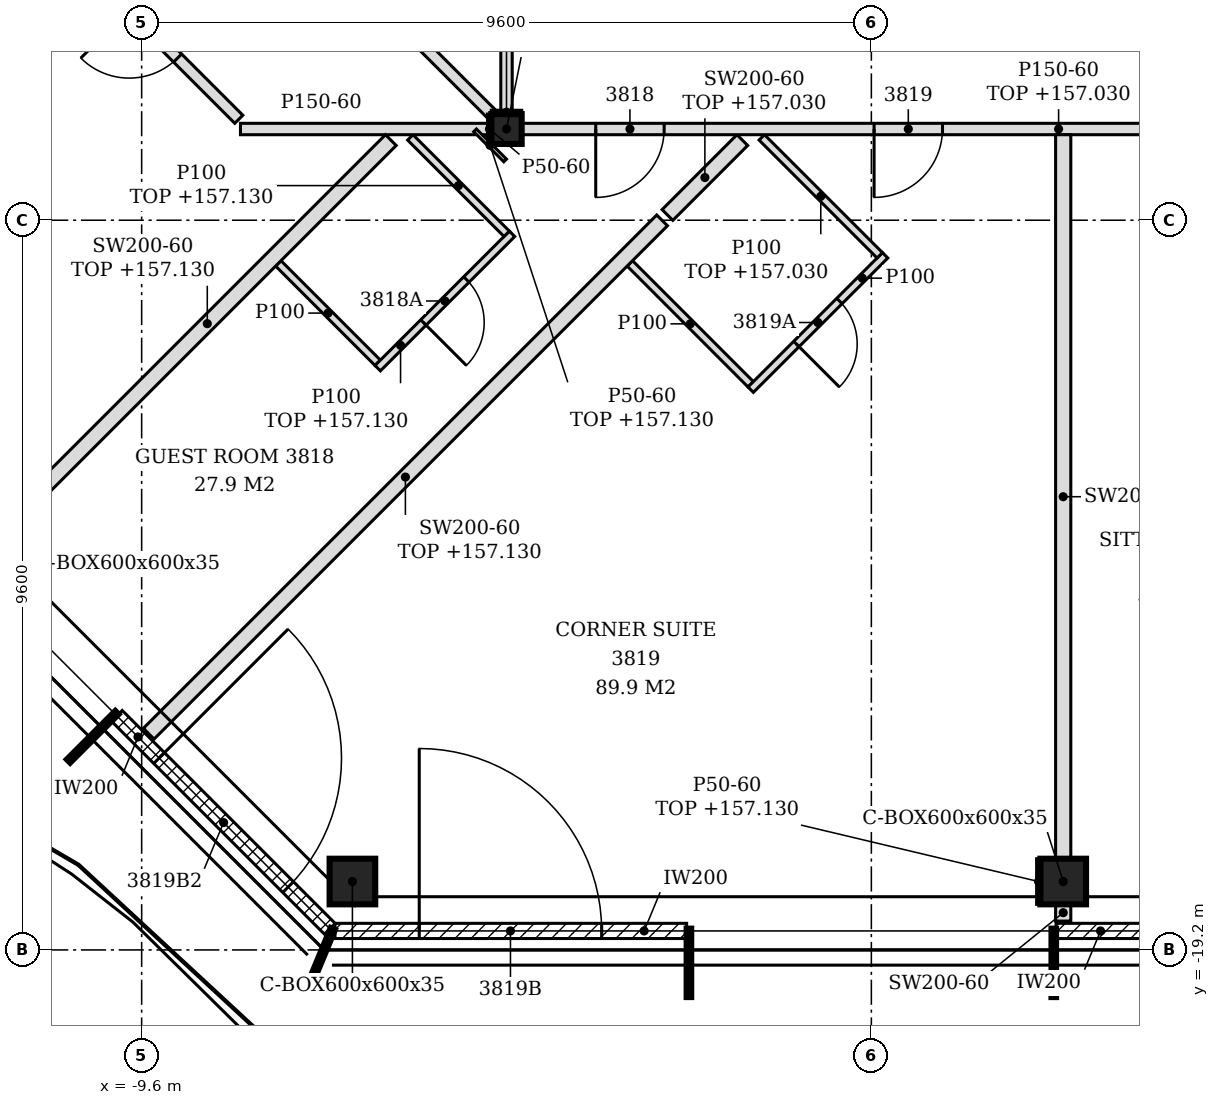
"""IFC4 building model, lengths in metres.
Left out: names, types, materials, properties, quantities, classifications, styles, units other than length and angle.
Written with IfcOpenShell. Run it as: python <this file> out.ifc"""

import sys

from ifc_helpers import new_model, si_unit, direction, frame, frame_2d, origin, origin_2d, place, context, subcontext, project, spatial, polyline, rectangle, hollow_rectangle, i_section, outline, extrude, element, fill, save


model = new_model("IFC4")
c1 = context("Model", 3, precision=1e-05, world=origin(), true_north=direction((0.0, 1.0)))
c2 = subcontext(c1, "Body", "Model", "MODEL_VIEW")
j1 = project(units=[si_unit("LENGTHUNIT", "METRE"), si_unit("PLANEANGLEUNIT", "RADIAN")], contexts=[c1])
p1 = place(None, origin())
s1 = spatial("IfcSite", under=j1, at=p1, CompositionType="ELEMENT")
p2 = place(p1, origin())
s2 = spatial("IfcBuilding", under=s1, at=p2, CompositionType="ELEMENT")
p3 = place(p2, frame((0.0, 0.0, 154.2)))
s3 = spatial("IfcBuildingStorey", under=s2, at=p3, CompositionType="ELEMENT", Elevation=154.2)
for number, where, z_axis, x_axis in (
    (1, (-6.827, -18.3, -0.15), (0.0, 0.0, 1.0), (1.0, 0.0, 0.0)),
    (2, (2.524, -18.3, -0.15), (0.0, 0.0, 1.0), (1.0, 0.0, 0.0)),
):
    element("IfcColumn", number, at=place(p3, frame(where, z_axis=z_axis, x_axis=x_axis)), inside=s3, PredefinedType="COLUMN", context=c2, shape_type="SweptSolid", body=[
        extrude(hollow_rectangle(XDim=0.6, YDim=0.6, WallThickness=0.035, at=origin_2d()), origin(), (0.0, 0.0, 1.0), 3.6),
    ])
p4 = place(p3, frame((-4.8, -8.4, -0.15), z_axis=(0.0, 0.0, 1.0), x_axis=(1.0, 0.0, 0.0)))
e3 = element("IfcColumn", 3, at=p4, inside=s3, PredefinedType="COLUMN", context=c2, shape_type="SweptSolid", body=[
    extrude(i_section(OverallWidth=0.399, OverallDepth=0.393, WebThickness=0.023, FlangeThickness=0.037, FilletRadius=0.015, at=origin_2d()), origin(), (0.0, 0.0, 1.0), 3.6),
])
p5 = place(p3, frame((-7.056, -18.95, 0.0), z_axis=(0.0, 0.0, 1.0), x_axis=(1.0, 0.0, 0.0)))
e4 = element("IfcWall", 4, at=p5, inside=s3, PredefinedType="NOTDEFINED", context=c2, shape_type="SweptSolid", body=[
    extrude(rectangle(XDim=4.626, YDim=0.2, at=frame_2d((2.313, 0.0))), origin(), (0.0, 0.0, 1.0), 3.45),
])
p6 = place(p5, frame((1.108, 0.0, 0.0)))
e5 = element("IfcOpeningElement", 5, at=p6, cuts=e4, PredefinedType="OPENING", context=c2, shape_type="SweptSolid", body=[
    extrude(rectangle(XDim=2.4, YDim=2.4, at=frame_2d((1.2, 1.2))), frame((0.0, 0.11, 0.0), z_axis=(0.0, -1.0, 0.0), x_axis=(1.0, 0.0, 0.0)), (0.0, 0.0, 1.0), 0.22),
])
p7 = place(p3, frame((2.43, -18.95, 0.0), z_axis=(0.0, 0.0, 1.0), x_axis=(1.0, 0.0, 0.0)))
e6 = element("IfcWall", 6, at=p7, inside=s3, PredefinedType="NOTDEFINED", context=c2, shape_type="SweptSolid", body=[
    extrude(rectangle(XDim=4.74, YDim=0.2, at=frame_2d((2.37, 0.0))), origin(), (0.0, 0.0, 1.0), 3.45),
])
p8 = place(p7, frame((1.17, 0.0, 0.0)))
e7 = element("IfcOpeningElement", 7, at=p8, cuts=e6, PredefinedType="OPENING", context=c2, shape_type="SweptSolid", body=[
    extrude(rectangle(XDim=2.4, YDim=2.4, at=frame_2d((1.2, 1.2))), frame((0.0, 0.11, 0.0), z_axis=(0.0, -1.0, 0.0), x_axis=(1.0, 0.0, 0.0)), (0.0, 0.0, 1.0), 0.22),
])
p9 = place(p3, frame((-9.926, -16.121, 0.0), z_axis=(0.0, 0.0, 1.0), x_axis=(0.707137595296, -0.707075965734, 0.0)))
e8 = element("IfcWall", 8, at=p9, inside=s3, PredefinedType="NOTDEFINED", context=c2, shape_type="SweptSolid", body=[
    extrude(rectangle(XDim=3.961, YDim=0.2, at=frame_2d((1.981, 0.0))), origin(), (0.0, 0.0, 1.0), 3.45),
])
p10 = place(p9, frame((0.785, 0.0, 0.0)))
e9 = element("IfcOpeningElement", 9, at=p10, cuts=e8, PredefinedType="OPENING", context=c2, shape_type="SweptSolid", body=[
    extrude(rectangle(XDim=2.4, YDim=2.4, at=frame_2d((1.2, 1.2))), frame((0.0, 0.11, 0.0), z_axis=(0.0, -1.0, 0.0), x_axis=(1.0, 0.0, 0.0)), (0.0, 0.0, 1.0), 0.22),
])
p11 = place(p3, frame((2.524, -18.82, 0.0), z_axis=(0.0, 0.0, 1.0), x_axis=(0.0, 1.0, 0.0)))
e10 = element("IfcWall", 10, at=p11, inside=s3, PredefinedType="PARTITIONING", context=c2, shape_type="SweptSolid", body=[
    extrude(rectangle(XDim=0.22, YDim=0.2, at=frame_2d((0.11, 0.0))), origin(), (0.0, 0.0, 1.0), 3.45),
])
p12 = place(p3, frame((2.524, -18.0, 0.0), z_axis=(0.0, 0.0, 1.0), x_axis=(0.0, 1.0, 0.0)))
e11 = element("IfcWall", 11, at=p12, inside=s3, PredefinedType="PARTITIONING", context=c2, shape_type="SweptSolid", body=[
    extrude(outline(polyline([(0.0, 0.0), (9.525, 0.0), (9.525, 2.83), (9.45, 2.83), (9.448, 3.45), (3.705, 3.45), (3.703, 2.88), (3.495, 2.88), (3.493, 3.45), (0.0, 3.45), (0.0, 0.0)])), frame((0.0, 0.1, 0.0), z_axis=(0.0, -1.0, 0.0), x_axis=(1.0, 0.0, 0.0)), (0.0, 0.0, 1.0), 0.2),
])
p13 = place(p3, frame((-9.507, -16.355, 0.0), z_axis=(0.0, 0.0, 1.0), x_axis=(0.707170680804, 0.707042875794, 0.0)))
e12 = element("IfcWall", 12, at=p13, inside=s3, PredefinedType="PARTITIONING", context=c2, shape_type="SweptSolid", body=[
    extrude(rectangle(XDim=9.551, YDim=0.2, at=frame_2d((4.776, 0.0))), origin(), (0.0, 0.0, 1.0), 2.93),
])
p14 = place(p3, frame((-11.152, -13.375, 0.0), z_axis=(0.0, 0.0, 1.0), x_axis=(0.707106781187, 0.707106781187, 0.0)))
e13 = element("IfcWall", 13, at=p14, inside=s3, PredefinedType="PARTITIONING", context=c2, shape_type="SweptSolid", body=[
    extrude(rectangle(XDim=6.83, YDim=0.2, at=frame_2d((3.415, 0.0))), origin(), (0.0, 0.0, 1.0), 2.93),
])
p15 = place(p3, frame((-1.587, -11.759, 0.0), z_axis=(0.0, 0.0, 1.0), x_axis=(-0.706889644159, 0.707323851557, 0.0)))
e14 = element("IfcWall", 14, at=p15, inside=s3, PredefinedType="PARTITIONING", context=c2, shape_type="SweptSolid", body=[
    extrude(rectangle(XDim=2.249, YDim=0.1, at=frame_2d((1.125, 0.0))), origin(), (0.0, 0.0, 1.0), 3.45),
])
p16 = place(p3, frame((-1.587, -11.829, 0.0), z_axis=(0.0, 0.0, 1.0), x_axis=(0.707350821469, 0.706862656651, 0.0)))
e15 = element("IfcWall", 15, at=p16, inside=s3, PredefinedType="PARTITIONING", context=c2, shape_type="SweptSolid", body=[
    extrude(rectangle(XDim=2.5, YDim=0.1, at=frame_2d((1.25, 0.0))), origin(), (0.0, 0.0, 1.0), 3.45),
])
p17 = place(p16, frame((0.85, 0.0, 0.0)))
e16 = element("IfcOpeningElement", 16, at=p17, cuts=e15, PredefinedType="OPENING", context=c2, shape_type="SweptSolid", body=[
    extrude(rectangle(XDim=0.8, YDim=2.1, at=frame_2d((0.4, 1.05))), frame((0.0, 0.06, 0.0), z_axis=(0.0, -1.0, 0.0), x_axis=(1.0, 0.0, 0.0)), (0.0, 0.0, 1.0), 0.12),
])
p18 = place(p3, frame((-6.494, -11.476, 0.0), z_axis=(0.0, 0.0, 1.0), x_axis=(-0.707106781187, 0.707106781187, 0.0)))
e17 = element("IfcWall", 17, at=p18, inside=s3, PredefinedType="PARTITIONING", context=c2, shape_type="SweptSolid", body=[
    extrude(rectangle(XDim=1.85, YDim=0.1, at=frame_2d((0.925, 0.0))), origin(), (0.0, 0.0, 1.0), 3.45),
])
p19 = place(p3, frame((-6.494, -11.546, 0.0), z_axis=(0.0, 0.0, 1.0), x_axis=(0.707106781187, 0.707106781187, 0.0)))
e18 = element("IfcWall", 18, at=p19, inside=s3, PredefinedType="PARTITIONING", context=c2, shape_type="SweptSolid", body=[
    extrude(rectangle(XDim=2.5, YDim=0.1, at=frame_2d((1.25, 0.0))), origin(), (0.0, 0.0, 1.0), 2.93),
])
p20 = place(p19, frame((0.85, 0.0, 0.0)))
e19 = element("IfcOpeningElement", 19, at=p20, cuts=e18, PredefinedType="OPENING", context=c2, shape_type="SweptSolid", body=[
    extrude(rectangle(XDim=0.8, YDim=2.1, at=frame_2d((0.4, 1.05))), frame((0.0, 0.06, 0.0), z_axis=(0.0, -1.0, 0.0), x_axis=(1.0, 0.0, 0.0)), (0.0, 0.0, 1.0), 0.12),
])
p21 = place(p3, frame((0.111, -10.062, 0.0), z_axis=(0.0, 0.0, 1.0), x_axis=(-0.70732924673, 0.706884245631, 0.0)))
e20 = element("IfcWall", 20, at=p21, inside=s3, PredefinedType="PARTITIONING", context=c2, shape_type="SweptSolid", body=[
    extrude(rectangle(XDim=2.195, YDim=0.1, at=frame_2d((1.097, 0.0))), origin(), (0.0, 0.0, 1.0), 2.83),
])
p22 = place(p3, frame((-4.797, -9.779, 0.0), z_axis=(0.0, 0.0, 1.0), x_axis=(-0.707174840937, 0.707038714885, 0.0)))
e21 = element("IfcWall", 21, at=p22, inside=s3, PredefinedType="PARTITIONING", context=c2, shape_type="SweptSolid", body=[
    extrude(rectangle(XDim=1.793, YDim=0.1, at=frame_2d((0.897, 0.0))), origin(), (0.0, 0.0, 1.0), 2.93),
])
p23 = place(p3, frame((-2.683, -9.531, 0.0), z_axis=(0.0, 0.0, 1.0), x_axis=(0.707019164958, 0.70719438656, 0.0)))
e22 = element("IfcWall", 22, at=p23, inside=s3, PredefinedType="PARTITIONING", context=c2, shape_type="SweptSolid", body=[
    extrude(rectangle(XDim=1.393, YDim=0.2, at=frame_2d((0.697, 0.0))), origin(), (0.0, 0.0, 1.0), 2.83),
])
p24 = place(p3, frame((-14.202, -9.402, 0.0), z_axis=(0.0, 0.0, 1.0), x_axis=(0.707081776084, 0.707131785404, 0.0)))
e23 = element("IfcWall", 23, at=p24, inside=s3, PredefinedType="PARTITIONING", context=c2, shape_type="SweptSolid", body=[
    extrude(rectangle(XDim=4.882, YDim=0.2, at=frame_2d((2.441, 0.0))), origin(), (0.0, 0.0, 1.0), 2.93),
])
p25 = place(p3, frame((-8.3, -8.4, 0.0), z_axis=(0.0, 0.0, 1.0), x_axis=(1.0, 0.0, 0.0)))
e24 = element("IfcWall", 24, at=p25, inside=s3, PredefinedType="PARTITIONING", context=c2, shape_type="SweptSolid", body=[
    extrude(rectangle(XDim=3.301, YDim=0.15, at=frame_2d((1.65, 0.0))), origin(), (0.0, 0.0, 1.0), 3.45),
])
p26 = place(p3, frame((-4.601, -8.4, 0.0), z_axis=(0.0, 0.0, 1.0), x_axis=(1.0, 0.0, 0.0)))
e25 = element("IfcWall", 25, at=p26, inside=s3, PredefinedType="PARTITIONING", context=c2, shape_type="SweptSolid", body=[
    extrude(rectangle(XDim=11.601, YDim=0.15, at=frame_2d((5.801, 0.0))), origin(), (0.0, 0.0, 1.0), 2.83),
])
p27 = place(p26, frame((0.974, 0.0, 0.0)))
e26 = element("IfcOpeningElement", 26, at=p27, cuts=e25, PredefinedType="OPENING", context=c2, shape_type="SweptSolid", body=[
    extrude(rectangle(XDim=0.9, YDim=2.1, at=frame_2d((0.45, 1.05))), frame((0.0, 0.085, 0.0), z_axis=(0.0, -1.0, 0.0), x_axis=(1.0, 0.0, 0.0)), (0.0, 0.0, 1.0), 0.17),
])
p28 = place(p26, frame((4.636, 0.0, 0.0)))
e27 = element("IfcOpeningElement", 27, at=p28, cuts=e25, PredefinedType="OPENING", context=c2, shape_type="SweptSolid", body=[
    extrude(rectangle(XDim=0.9, YDim=2.1, at=frame_2d((0.45, 1.05))), frame((0.0, 0.085, 0.0), z_axis=(0.0, -1.0, 0.0), x_axis=(1.0, 0.0, 0.0)), (0.0, 0.0, 1.0), 0.17),
])
p29 = place(p26, frame((8.592, 0.0, 0.0)))
e28 = element("IfcOpeningElement", 28, at=p29, cuts=e25, PredefinedType="OPENING", context=c2, shape_type="SweptSolid", body=[
    extrude(rectangle(XDim=0.9, YDim=2.1, at=frame_2d((0.45, 1.05))), frame((0.0, 0.085, 0.0), z_axis=(0.0, -1.0, 0.0), x_axis=(1.0, 0.0, 0.0)), (0.0, 0.0, 1.0), 0.17),
])
p30 = place(p3, frame((-8.322, -8.272, 0.0), z_axis=(0.0, 0.0, 1.0), x_axis=(-0.707106781187, 0.707106781187, 0.0)))
e29 = element("IfcWall", 29, at=p30, inside=s3, PredefinedType="PARTITIONING", context=c2, shape_type="SweptSolid", body=[
    extrude(rectangle(XDim=5.021, YDim=0.15, at=frame_2d((2.51, 0.0))), origin(), (0.0, 0.0, 1.0), 2.93),
])
p31 = place(p30, frame((1.139, 0.0, 0.0)))
e30 = element("IfcOpeningElement", 30, at=p31, cuts=e29, PredefinedType="OPENING", context=c2, shape_type="SweptSolid", body=[
    extrude(rectangle(XDim=0.9, YDim=2.1, at=frame_2d((0.45, 1.05))), frame((0.0, 0.085, 0.0), z_axis=(0.0, -1.0, 0.0), x_axis=(1.0, 0.0, 0.0)), (0.0, 0.0, 1.0), 0.17),
])
p32 = place(p3, frame((-4.998, -8.202, 0.0), z_axis=(0.0, 0.0, 1.0), x_axis=(-0.707106781187, 0.707106781187, 0.0)))
e31 = element("IfcWall", 31, at=p32, inside=s3, PredefinedType="PARTITIONING", context=c2, shape_type="SweptSolid", body=[
    extrude(rectangle(XDim=6.327, YDim=0.15, at=frame_2d((3.164, 0.0))), origin(), (0.0, 0.0, 1.0), 2.93),
])
p33 = place(p32, frame((2.664, 0.0, 0.0)))
e32 = element("IfcOpeningElement", 32, at=p33, cuts=e31, PredefinedType="OPENING", context=c2, shape_type="SweptSolid", body=[
    extrude(rectangle(XDim=0.9, YDim=2.1, at=frame_2d((0.45, 1.05))), frame((0.0, 0.085, 0.0), z_axis=(0.0, -1.0, 0.0), x_axis=(1.0, 0.0, 0.0)), (0.0, 0.0, 1.0), 0.17),
])
p34 = place(p3, frame((-4.8, -8.204, 0.0), z_axis=(0.0, 0.0, 1.0), x_axis=(0.0, 1.0, 0.0)))
e33 = element("IfcWall", 33, at=p34, inside=s3, PredefinedType="PARTITIONING", context=c2, shape_type="SweptSolid", body=[
    extrude(rectangle(XDim=4.529, YDim=0.15, at=frame_2d((2.264, 0.0))), origin(), (0.0, 0.0, 1.0), 2.83),
])
p35 = place(p3, frame((2.199, -18.6, 0.0), z_axis=(0.0, 0.0, 1.0), x_axis=(0.0, 1.0, 0.0)))
e34 = element("IfcWall", 34, at=p35, inside=s3, PredefinedType="PARTITIONING", context=c2, shape_type="SweptSolid", body=[
    extrude(rectangle(XDim=0.6, YDim=0.05, at=frame_2d((0.3, 0.0))), origin(), (0.0, 0.0, 1.0), 2.93),
])
p36 = place(p3, frame((-5.0, -8.178, 0.0), z_axis=(0.0, 0.0, 1.0), x_axis=(1.0, 0.0, 0.0)))
e35 = element("IfcWall", 35, at=p36, inside=s3, PredefinedType="PARTITIONING", context=c2, shape_type="SweptSolid", body=[
    extrude(rectangle(XDim=0.399, YDim=0.05, at=frame_2d((0.199, 0.0))), origin(), (0.0, 0.0, 1.0), 2.83),
])
p37 = place(p3, frame((-4.818, -8.814, 0.0), z_axis=(0.0, 0.0, 1.0), x_axis=(-0.707106781187, 0.707106781187, 0.0)))
e36 = element("IfcWall", 36, at=p37, inside=s3, PredefinedType="PARTITIONING", context=c2, shape_type="SweptSolid", body=[
    extrude(rectangle(XDim=0.56, YDim=0.05, at=frame_2d((0.28, 0.0))), origin(), (0.0, 0.0, 1.0), 2.93),
])
p38 = place(p3, frame((-5.024, -8.596, 0.0), z_axis=(0.0, 0.0, 1.0), x_axis=(0.0, 1.0, 0.0)))
e37 = element("IfcWall", 37, at=p38, inside=s3, PredefinedType="PARTITIONING", context=c2, shape_type="SweptSolid", body=[
    extrude(rectangle(XDim=0.393, YDim=0.05, at=frame_2d((0.196, 0.0))), origin(), (0.0, 0.0, 1.0), 3.45),
])
p39 = place(p6, origin())
e38 = element("IfcDoor", 38, at=p39, inside=s3, OperationType="SINGLE_SWING_LEFT", PredefinedType="DOOR", context=c2, shape_type="SweptSolid", body=[
    extrude(rectangle(XDim=2.4, YDim=2.4, at=frame_2d((1.2, 1.2))), frame((0.0, 0.025, 0.0), z_axis=(0.0, -1.0, 0.0), x_axis=(1.0, 0.0, 0.0)), (0.0, 0.0, 1.0), 0.05),
])
fill(e5, e38)
p40 = place(p10, origin())
e39 = element("IfcDoor", 39, at=p40, inside=s3, OperationType="SINGLE_SWING_LEFT", PredefinedType="DOOR", context=c2, shape_type="SweptSolid", body=[
    extrude(rectangle(XDim=2.4, YDim=2.4, at=frame_2d((1.2, 1.2))), frame((0.0, 0.025, 0.0), z_axis=(0.0, -1.0, 0.0), x_axis=(1.0, 0.0, 0.0)), (0.0, 0.0, 1.0), 0.05),
])
fill(e9, e39)
p41 = place(p31, origin())
e40 = element("IfcDoor", 40, at=p41, inside=s3, OperationType="SINGLE_SWING_RIGHT", PredefinedType="DOOR", context=c2, shape_type="SweptSolid", body=[
    extrude(rectangle(XDim=0.9, YDim=2.1, at=frame_2d((0.45, 1.05))), frame((0.0, 0.025, 0.0), z_axis=(0.0, -1.0, 0.0), x_axis=(1.0, 0.0, 0.0)), (0.0, 0.0, 1.0), 0.05),
])
fill(e30, e40)
p42 = place(p27, frame((0.9, 0.0, 0.0), z_axis=(0.0, 0.0, 1.0), x_axis=(-1.0, 0.0, 0.0)))
e41 = element("IfcDoor", 41, at=p42, inside=s3, OperationType="SINGLE_SWING_RIGHT", PredefinedType="DOOR", context=c2, shape_type="SweptSolid", body=[
    extrude(rectangle(XDim=0.9, YDim=2.1, at=frame_2d((0.45, 1.05))), frame((0.0, 0.025, 0.0), z_axis=(0.0, -1.0, 0.0), x_axis=(1.0, 0.0, 0.0)), (0.0, 0.0, 1.0), 0.05),
])
fill(e26, e41)
p43 = place(p20, frame((0.8, 0.0, 0.0), z_axis=(0.0, 0.0, 1.0), x_axis=(-1.0, 0.0, 0.0)))
e42 = element("IfcDoor", 42, at=p43, inside=s3, OperationType="SINGLE_SWING_RIGHT", PredefinedType="DOOR", context=c2, shape_type="SweptSolid", body=[
    extrude(rectangle(XDim=0.8, YDim=2.1, at=frame_2d((0.4, 1.05))), frame((0.0, 0.025, 0.0), z_axis=(0.0, -1.0, 0.0), x_axis=(1.0, 0.0, 0.0)), (0.0, 0.0, 1.0), 0.05),
])
fill(e19, e42)
p44 = place(p28, frame((0.9, 0.0, 0.0), z_axis=(0.0, 0.0, 1.0), x_axis=(-1.0, 0.0, 0.0)))
e43 = element("IfcDoor", 43, at=p44, inside=s3, OperationType="SINGLE_SWING_RIGHT", PredefinedType="DOOR", context=c2, shape_type="SweptSolid", body=[
    extrude(rectangle(XDim=0.9, YDim=2.1, at=frame_2d((0.45, 1.05))), frame((0.0, 0.025, 0.0), z_axis=(0.0, -1.0, 0.0), x_axis=(1.0, 0.0, 0.0)), (0.0, 0.0, 1.0), 0.05),
])
fill(e27, e43)
p45 = place(p17, frame((0.8, 0.0, 0.0), z_axis=(0.0, 0.0, 1.0), x_axis=(-1.0, 0.0, 0.0)))
e44 = element("IfcDoor", 44, at=p45, inside=s3, OperationType="SINGLE_SWING_RIGHT", PredefinedType="DOOR", context=c2, shape_type="SweptSolid", body=[
    extrude(rectangle(XDim=0.8, YDim=2.1, at=frame_2d((0.4, 1.05))), frame((0.0, 0.025, 0.0), z_axis=(0.0, -1.0, 0.0), x_axis=(1.0, 0.0, 0.0)), (0.0, 0.0, 1.0), 0.05),
])
fill(e16, e44)
save(model, sys.argv[1])
